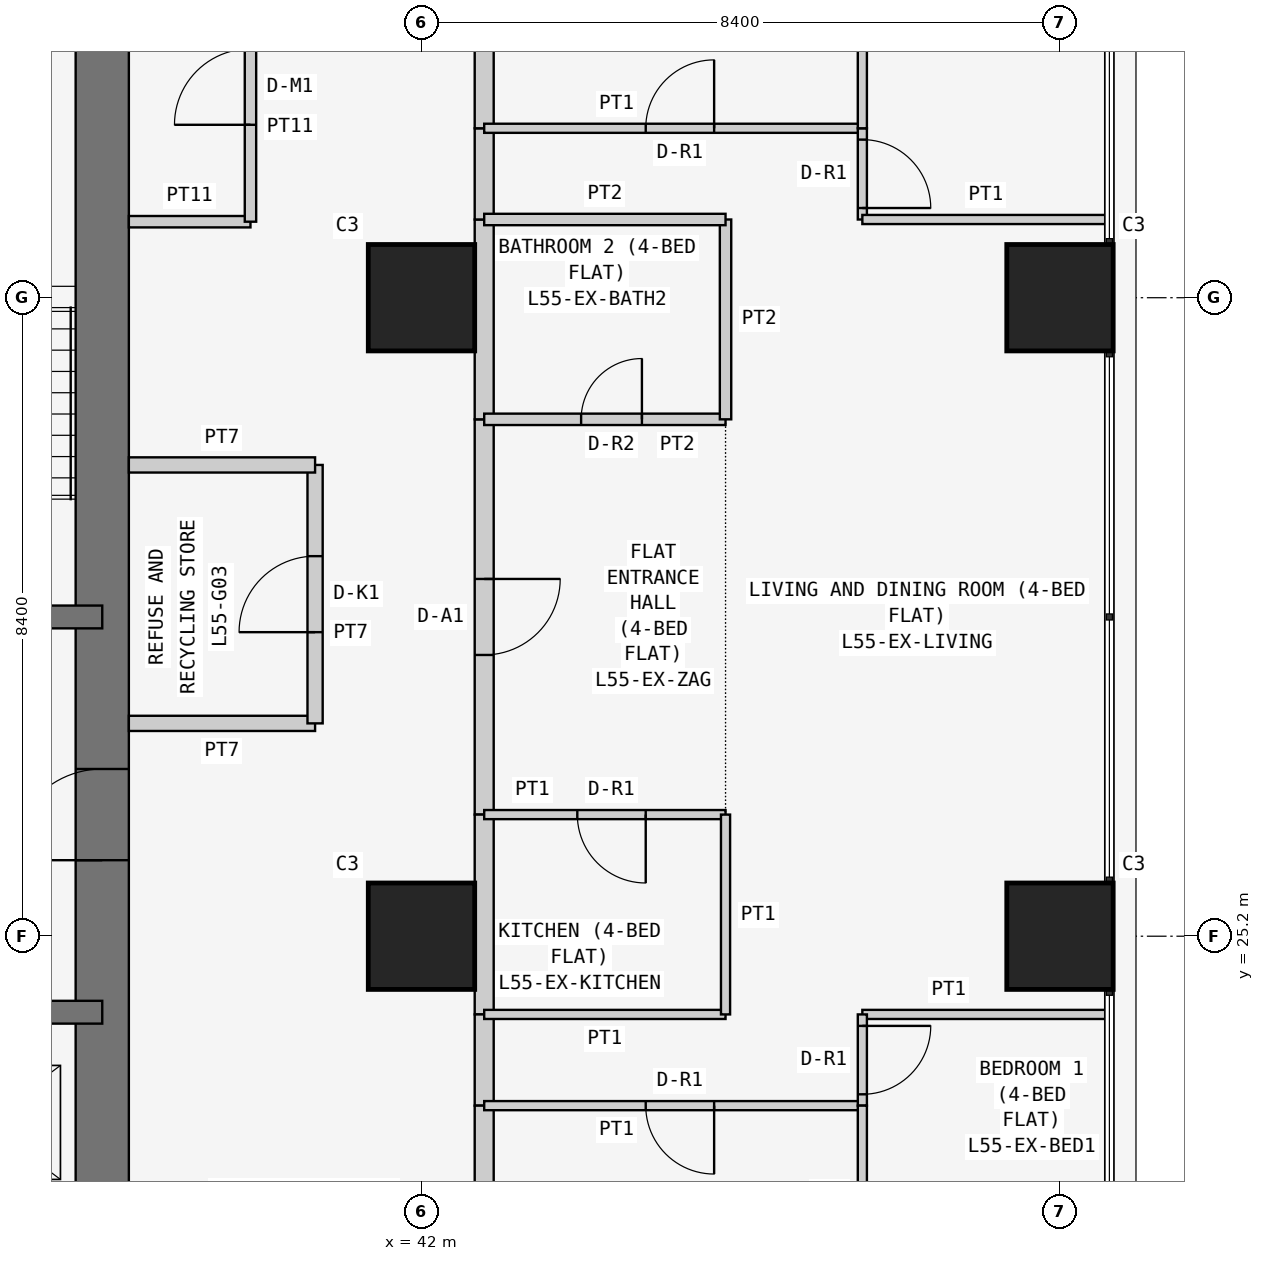
"""IFC4 building model, lengths in metres.
Left out: names, types, materials, properties, quantities, classifications, styles, units other than length and angle.
Written with IfcOpenShell. Run it as: python <this file> out.ifc"""

import sys

from ifc_helpers import new_model, si_unit, direction, frame, frame_2d, origin, origin_2d, place, context, subcontext, project, spatial, rectangle, extrude, element, fill, save


model = new_model("IFC4")
c1 = context("Model", 3, precision=1e-05, world=origin(), true_north=direction((0.0, 1.0)))
c2 = subcontext(c1, "Body", "Model", "MODEL_VIEW")
j1 = project(units=[si_unit("LENGTHUNIT", "METRE"), si_unit("PLANEANGLEUNIT", "RADIAN")], contexts=[c1])
p1 = place(None, origin())
s1 = spatial("IfcSite", under=j1, at=p1, CompositionType="ELEMENT")
p2 = place(p1, origin())
s2 = spatial("IfcBuilding", under=s1, at=p2, CompositionType="ELEMENT")
p3 = place(p2, frame((0.0, 0.0, 212.1)))
s3 = spatial("IfcBuildingStorey", under=s2, at=p3, CompositionType="ELEMENT", Elevation=212.1)
for number, where, z_axis, x_axis in (
    (1, (42.0, 25.2, 0.0), (0.0, 0.0, 1.0), (1.0, 0.0, 0.0)),
    (2, (42.0, 33.6, 0.0), (0.0, 0.0, 1.0), (1.0, 0.0, 0.0)),
    (3, (50.4, 25.2, 0.0), (0.0, 0.0, 1.0), (1.0, 0.0, 0.0)),
    (4, (50.4, 33.6, 0.0), (0.0, 0.0, 1.0), (1.0, 0.0, 0.0)),
):
    element("IfcColumn", number, at=place(p3, frame(where, z_axis=z_axis, x_axis=x_axis)), inside=s3, PredefinedType="COLUMN", context=c2, shape_type="SweptSolid", body=[
        extrude(rectangle(XDim=1.4, YDim=1.4, at=origin_2d()), origin(), (0.0, 0.0, 1.0), 3.6),
    ])
p4 = place(p3, frame((37.8, 21.0, 0.0), z_axis=(0.0, 0.0, 1.0), x_axis=(0.0, 1.0, 0.0)))
e5 = element("IfcWall", 5, at=p4, inside=s3, PredefinedType="SHEAR", context=c2, shape_type="SweptSolid", body=[
    extrude(rectangle(XDim=17.15, YDim=0.7, at=frame_2d((8.575, 0.0))), origin(), (0.0, 0.0, 1.0), 3.6),
])
p5 = place(p4, frame((5.2, 0.0, 0.0)))
e6 = element("IfcOpeningElement", 6, at=p5, cuts=e5, PredefinedType="OPENING", context=c2, shape_type="SweptSolid", body=[
    extrude(rectangle(XDim=1.2, YDim=2.1, at=frame_2d((0.6, 1.05))), frame((0.0, 0.36, 0.0), z_axis=(0.0, -1.0, 0.0), x_axis=(1.0, 0.0, 0.0)), (0.0, 0.0, 1.0), 0.72),
])
p6 = place(p3, frame((26.6, 24.2, 0.0), z_axis=(0.0, 0.0, 1.0), x_axis=(1.0, 0.0, 0.0)))
e7 = element("IfcWall", 7, at=p6, inside=s3, PredefinedType="SHEAR", context=c2, shape_type="SweptSolid", body=[
    extrude(rectangle(XDim=11.2, YDim=0.3, at=frame_2d((5.6, 0.0))), origin(), (0.0, 0.0, 1.0), 3.6),
])
p7 = place(p6, frame((0.913, 0.0, 0.0)))
e8 = element("IfcOpeningElement", 8, at=p7, cuts=e7, PredefinedType="OPENING", context=c2, shape_type="SweptSolid", body=[
    extrude(rectangle(XDim=1.0, YDim=2.1, at=frame_2d((0.5, 1.05))), frame((0.0, 0.16, 0.0), z_axis=(0.0, -1.0, 0.0), x_axis=(1.0, 0.0, 0.0)), (0.0, 0.0, 1.0), 0.32),
])
p8 = place(p6, frame((3.75, 0.0, 0.0)))
e9 = element("IfcOpeningElement", 9, at=p8, cuts=e7, PredefinedType="OPENING", context=c2, shape_type="SweptSolid", body=[
    extrude(rectangle(XDim=0.9, YDim=2.1, at=frame_2d((0.45, 1.05))), frame((0.0, 0.16, 0.0), z_axis=(0.0, -1.0, 0.0), x_axis=(1.0, 0.0, 0.0)), (0.0, 0.0, 1.0), 0.32),
])
p9 = place(p6, frame((6.45, 0.0, 0.0)))
e10 = element("IfcOpeningElement", 10, at=p9, cuts=e7, PredefinedType="OPENING", context=c2, shape_type="SweptSolid", body=[
    extrude(rectangle(XDim=1.1, YDim=2.1, at=frame_2d((0.55, 1.05))), frame((0.0, 0.16, 0.0), z_axis=(0.0, -1.0, 0.0), x_axis=(1.0, 0.0, 0.0)), (0.0, 0.0, 1.0), 0.32),
])
p10 = place(p6, frame((9.1, 0.0, 0.0)))
e11 = element("IfcOpeningElement", 11, at=p10, cuts=e7, PredefinedType="OPENING", context=c2, shape_type="SweptSolid", body=[
    extrude(rectangle(XDim=1.1, YDim=2.1, at=frame_2d((0.55, 1.05))), frame((0.0, 0.16, 0.0), z_axis=(0.0, -1.0, 0.0), x_axis=(1.0, 0.0, 0.0)), (0.0, 0.0, 1.0), 0.32),
])
p11 = place(p3, frame((32.2, 29.4, 0.0), z_axis=(0.0, 0.0, 1.0), x_axis=(1.0, 0.0, 0.0)))
e12 = element("IfcWall", 12, at=p11, inside=s3, PredefinedType="SHEAR", context=c2, shape_type="SweptSolid", body=[
    extrude(rectangle(XDim=5.6, YDim=0.3, at=frame_2d((2.8, 0.0))), origin(), (0.0, 0.0, 1.0), 3.6),
])
p12 = place(p11, frame((2.0, 0.0, 0.0)))
e13 = element("IfcOpeningElement", 13, at=p12, cuts=e12, PredefinedType="OPENING", context=c2, shape_type="SweptSolid", body=[
    extrude(rectangle(XDim=1.2, YDim=2.1, at=frame_2d((0.6, 1.05))), frame((0.0, 0.16, 0.0), z_axis=(0.0, -1.0, 0.0), x_axis=(1.0, 0.0, 0.0)), (0.0, 0.0, 1.0), 0.32),
])
p13 = place(p3, frame((38.15, 28.0, 0.0), z_axis=(0.0, 0.0, 1.0), x_axis=(1.0, 0.0, 0.0)))
e14 = element("IfcWall", 14, at=p13, inside=s3, PredefinedType="PARTITIONING", context=c2, shape_type="SweptSolid", body=[
    extrude(rectangle(XDim=2.45, YDim=0.2, at=frame_2d((1.225, 0.0))), origin(), (0.0, 0.0, 1.0), 3.45),
])
p14 = place(p3, frame((40.6, 28.0, 0.0), z_axis=(0.0, 0.0, 1.0), x_axis=(0.0, 1.0, 0.0)))
e15 = element("IfcWall", 15, at=p14, inside=s3, PredefinedType="PARTITIONING", context=c2, shape_type="SweptSolid", body=[
    extrude(rectangle(XDim=3.4, YDim=0.2, at=frame_2d((1.7, 0.0))), origin(), (0.0, 0.0, 1.0), 3.45),
])
p15 = place(p14, frame((1.2, 0.0, 0.0)))
e16 = element("IfcOpeningElement", 16, at=p15, cuts=e15, PredefinedType="OPENING", context=c2, shape_type="SweptSolid", body=[
    extrude(rectangle(XDim=1.0, YDim=2.1, at=frame_2d((0.5, 1.05))), frame((0.0, 0.11, 0.0), z_axis=(0.0, -1.0, 0.0), x_axis=(1.0, 0.0, 0.0)), (0.0, 0.0, 1.0), 0.22),
])
p16 = place(p3, frame((40.6, 31.4, 0.0), z_axis=(0.0, 0.0, 1.0), x_axis=(-1.0, 0.0, 0.0)))
e17 = element("IfcWall", 17, at=p16, inside=s3, PredefinedType="PARTITIONING", context=c2, shape_type="SweptSolid", body=[
    extrude(rectangle(XDim=2.45, YDim=0.2, at=frame_2d((1.225, 0.0))), origin(), (0.0, 0.0, 1.0), 3.45),
])
p17 = place(p3, frame((38.15, 34.6, 0.0), z_axis=(0.0, 0.0, 1.0), x_axis=(1.0, 0.0, 0.0)))
e18 = element("IfcWall", 18, at=p17, inside=s3, PredefinedType="PARTITIONING", context=c2, shape_type="SweptSolid", body=[
    extrude(rectangle(XDim=1.6, YDim=0.15, at=frame_2d((0.8, 0.0))), origin(), (0.0, 0.0, 1.0), 3.45),
])
p18 = place(p3, frame((39.75, 34.6, 0.0), z_axis=(0.0, 0.0, 1.0), x_axis=(0.0, 1.0, 0.0)))
e19 = element("IfcWall", 19, at=p18, inside=s3, PredefinedType="PARTITIONING", context=c2, shape_type="SweptSolid", body=[
    extrude(rectangle(XDim=3.55, YDim=0.15, at=frame_2d((1.775, 0.0))), origin(), (0.0, 0.0, 1.0), 3.45),
])
p19 = place(p18, frame((1.275, 0.0, 0.0)))
e20 = element("IfcOpeningElement", 20, at=p19, cuts=e19, PredefinedType="OPENING", context=c2, shape_type="SweptSolid", body=[
    extrude(rectangle(XDim=1.0, YDim=2.1, at=frame_2d((0.5, 1.05))), frame((0.0, 0.085, 0.0), z_axis=(0.0, -1.0, 0.0), x_axis=(1.0, 0.0, 0.0)), (0.0, 0.0, 1.0), 0.17),
])
p20 = place(p3, frame((42.825, 32.0, 0.0), z_axis=(0.0, 0.0, 1.0), x_axis=(0.0, -1.0, 0.0)))
e21 = element("IfcWall", 21, at=p20, inside=s3, PredefinedType="PARTITIONING", context=c2, shape_type="SweptSolid", body=[
    extrude(rectangle(XDim=5.2, YDim=0.25, at=frame_2d((2.6, 0.0))), origin(), (0.0, 0.0, 1.0), 3.45),
])
p21 = place(p20, frame((2.1, 0.0, 0.0)))
e22 = element("IfcOpeningElement", 22, at=p21, cuts=e21, PredefinedType="OPENING", context=c2, shape_type="SweptSolid", body=[
    extrude(rectangle(XDim=1.0, YDim=2.1, at=frame_2d((0.5, 1.05))), frame((0.0, 0.135, 0.0), z_axis=(0.0, -1.0, 0.0), x_axis=(1.0, 0.0, 0.0)), (0.0, 0.0, 1.0), 0.27),
])
p22 = place(p3, frame((42.825, 34.629, 0.0), z_axis=(0.0, 0.0, 1.0), x_axis=(0.0, -1.0, 0.0)))
e23 = element("IfcWall", 23, at=p22, inside=s3, PredefinedType="PARTITIONING", context=c2, shape_type="SweptSolid", body=[
    extrude(rectangle(XDim=2.629, YDim=0.25, at=frame_2d((1.314, 0.0))), origin(), (0.0, 0.0, 1.0), 3.45),
])
p23 = place(p3, frame((42.825, 26.8, 0.0), z_axis=(0.0, 0.0, 1.0), x_axis=(0.0, -1.0, 0.0)))
e24 = element("IfcWall", 24, at=p23, inside=s3, PredefinedType="PARTITIONING", context=c2, shape_type="SweptSolid", body=[
    extrude(rectangle(XDim=2.629, YDim=0.25, at=frame_2d((1.314, 0.0))), origin(), (0.0, 0.0, 1.0), 3.45),
])
p24 = place(p3, frame((42.825, 24.171, 0.0), z_axis=(0.0, 0.0, 1.0), x_axis=(0.0, -1.0, 0.0)))
e25 = element("IfcWall", 25, at=p24, inside=s3, PredefinedType="PARTITIONING", context=c2, shape_type="SweptSolid", body=[
    extrude(rectangle(XDim=1.2, YDim=0.25, at=frame_2d((0.6, 0.0))), origin(), (0.0, 0.0, 1.0), 3.45),
])
p25 = place(p3, frame((42.825, 35.829, 0.0), z_axis=(0.0, 0.0, 1.0), x_axis=(0.0, -1.0, 0.0)))
e26 = element("IfcWall", 26, at=p25, inside=s3, PredefinedType="PARTITIONING", context=c2, shape_type="SweptSolid", body=[
    extrude(rectangle(XDim=1.2, YDim=0.25, at=frame_2d((0.6, 0.0))), origin(), (0.0, 0.0, 1.0), 3.45),
])
for number, where, z_axis, x_axis in (
    (27, (42.825, 42.7, 0.0), (0.0, 0.0, 1.0), (0.0, -1.0, 0.0)),
    (28, (42.825, 22.971, 0.0), (0.0, 0.0, 1.0), (0.0, -1.0, 0.0)),
):
    element("IfcWall", number, at=place(p3, frame(where, z_axis=z_axis, x_axis=x_axis)), inside=s3, PredefinedType="PARTITIONING", context=c2, shape_type="SweptSolid", body=[
        extrude(rectangle(XDim=6.871, YDim=0.25, at=frame_2d((3.436, 0.0))), origin(), (0.0, 0.0, 1.0), 3.45),
    ])
p26 = place(p3, frame((46.0, 32.0, 0.0), z_axis=(0.0, 0.0, 1.0), x_axis=(-1.0, 0.0, 0.0)))
e29 = element("IfcWall", 29, at=p26, inside=s3, PredefinedType="PARTITIONING", context=c2, shape_type="SweptSolid", body=[
    extrude(rectangle(XDim=3.175, YDim=0.15, at=frame_2d((1.587, 0.0))), origin(), (0.0, 0.0, 1.0), 3.45),
])
p27 = place(p26, frame((1.1, 0.0, 0.0)))
e30 = element("IfcOpeningElement", 30, at=p27, cuts=e29, PredefinedType="OPENING", context=c2, shape_type="SweptSolid", body=[
    extrude(rectangle(XDim=0.8, YDim=2.1, at=frame_2d((0.4, 1.05))), frame((0.0, 0.085, 0.0), z_axis=(0.0, -1.0, 0.0), x_axis=(1.0, 0.0, 0.0)), (0.0, 0.0, 1.0), 0.17),
])
p28 = place(p3, frame((42.825, 26.8, 0.0), z_axis=(0.0, 0.0, 1.0), x_axis=(1.0, 0.0, 0.0)))
e31 = element("IfcWall", 31, at=p28, inside=s3, PredefinedType="PARTITIONING", context=c2, shape_type="SweptSolid", body=[
    extrude(rectangle(XDim=3.175, YDim=0.12, at=frame_2d((1.587, 0.0))), origin(), (0.0, 0.0, 1.0), 3.45),
])
p29 = place(p28, frame((1.225, 0.0, 0.0)))
e32 = element("IfcOpeningElement", 32, at=p29, cuts=e31, PredefinedType="OPENING", context=c2, shape_type="SweptSolid", body=[
    extrude(rectangle(XDim=0.9, YDim=2.1, at=frame_2d((0.45, 1.05))), frame((0.0, 0.07, 0.0), z_axis=(0.0, -1.0, 0.0), x_axis=(1.0, 0.0, 0.0)), (0.0, 0.0, 1.0), 0.14),
])
p30 = place(p3, frame((46.0, 32.0, 0.0), z_axis=(0.0, 0.0, 1.0), x_axis=(0.0, 1.0, 0.0)))
e33 = element("IfcWall", 33, at=p30, inside=s3, PredefinedType="PARTITIONING", context=c2, shape_type="SweptSolid", body=[
    extrude(rectangle(XDim=2.629, YDim=0.15, at=frame_2d((1.314, 0.0))), origin(), (0.0, 0.0, 1.0), 3.45),
])
p31 = place(p3, frame((46.0, 34.629, 0.0), z_axis=(0.0, 0.0, 1.0), x_axis=(-1.0, 0.0, 0.0)))
e34 = element("IfcWall", 34, at=p31, inside=s3, PredefinedType="PARTITIONING", context=c2, shape_type="SweptSolid", body=[
    extrude(rectangle(XDim=3.175, YDim=0.15, at=frame_2d((1.587, 0.0))), origin(), (0.0, 0.0, 1.0), 3.45),
])
p32 = place(p3, frame((42.825, 24.171, 0.0), z_axis=(0.0, 0.0, 1.0), x_axis=(1.0, 0.0, 0.0)))
e35 = element("IfcWall", 35, at=p32, inside=s3, PredefinedType="PARTITIONING", context=c2, shape_type="SweptSolid", body=[
    extrude(rectangle(XDim=3.175, YDim=0.12, at=frame_2d((1.587, 0.0))), origin(), (0.0, 0.0, 1.0), 3.45),
])
p33 = place(p3, frame((46.0, 24.171, 0.0), z_axis=(0.0, 0.0, 1.0), x_axis=(0.0, 1.0, 0.0)))
e36 = element("IfcWall", 36, at=p33, inside=s3, PredefinedType="PARTITIONING", context=c2, shape_type="SweptSolid", body=[
    extrude(rectangle(XDim=2.629, YDim=0.12, at=frame_2d((1.314, 0.0))), origin(), (0.0, 0.0, 1.0), 3.45),
])
p34 = place(p3, frame((42.825, 35.829, 0.0), z_axis=(0.0, 0.0, 1.0), x_axis=(1.0, 0.0, 0.0)))
e37 = element("IfcWall", 37, at=p34, inside=s3, PredefinedType="PARTITIONING", context=c2, shape_type="SweptSolid", body=[
    extrude(rectangle(XDim=4.975, YDim=0.12, at=frame_2d((2.488, 0.0))), origin(), (0.0, 0.0, 1.0), 3.45),
])
p35 = place(p34, frame((2.125, 0.0, 0.0)))
e38 = element("IfcOpeningElement", 38, at=p35, cuts=e37, PredefinedType="OPENING", context=c2, shape_type="SweptSolid", body=[
    extrude(rectangle(XDim=0.9, YDim=2.1, at=frame_2d((0.45, 1.05))), frame((0.0, 0.07, 0.0), z_axis=(0.0, -1.0, 0.0), x_axis=(1.0, 0.0, 0.0)), (0.0, 0.0, 1.0), 0.14),
])
p36 = place(p3, frame((47.8, 35.829, 0.0), z_axis=(0.0, 0.0, 1.0), x_axis=(0.0, -1.0, 0.0)))
e39 = element("IfcWall", 39, at=p36, inside=s3, PredefinedType="PARTITIONING", context=c2, shape_type="SweptSolid", body=[
    extrude(rectangle(XDim=1.2, YDim=0.12, at=frame_2d((0.6, 0.0))), origin(), (0.0, 0.0, 1.0), 3.45),
])
p37 = place(p36, frame((0.149, 0.0, 0.0)))
e40 = element("IfcOpeningElement", 40, at=p37, cuts=e39, PredefinedType="OPENING", context=c2, shape_type="SweptSolid", body=[
    extrude(rectangle(XDim=0.9, YDim=2.1, at=frame_2d((0.45, 1.05))), frame((0.0, 0.07, 0.0), z_axis=(0.0, -1.0, 0.0), x_axis=(1.0, 0.0, 0.0)), (0.0, 0.0, 1.0), 0.14),
])
p38 = place(p3, frame((47.8, 34.629, 0.0), z_axis=(0.0, 0.0, 1.0), x_axis=(1.0, 0.0, 0.0)))
e41 = element("IfcWall", 41, at=p38, inside=s3, PredefinedType="PARTITIONING", context=c2, shape_type="SweptSolid", body=[
    extrude(rectangle(XDim=3.25, YDim=0.12, at=frame_2d((1.625, 0.0))), origin(), (0.0, 0.0, 1.0), 3.45),
])
p39 = place(p3, frame((47.8, 22.971, 0.0), z_axis=(0.0, 0.0, 1.0), x_axis=(-1.0, 0.0, 0.0)))
e42 = element("IfcWall", 42, at=p39, inside=s3, PredefinedType="PARTITIONING", context=c2, shape_type="SweptSolid", body=[
    extrude(rectangle(XDim=4.975, YDim=0.12, at=frame_2d((2.488, 0.0))), origin(), (0.0, 0.0, 1.0), 3.45),
])
p40 = place(p39, frame((1.95, 0.0, 0.0)))
e43 = element("IfcOpeningElement", 43, at=p40, cuts=e42, PredefinedType="OPENING", context=c2, shape_type="SweptSolid", body=[
    extrude(rectangle(XDim=0.9, YDim=2.1, at=frame_2d((0.45, 1.05))), frame((0.0, 0.07, 0.0), z_axis=(0.0, -1.0, 0.0), x_axis=(1.0, 0.0, 0.0)), (0.0, 0.0, 1.0), 0.14),
])
p41 = place(p3, frame((51.05, 24.171, 0.0), z_axis=(0.0, 0.0, 1.0), x_axis=(-1.0, 0.0, 0.0)))
e44 = element("IfcWall", 44, at=p41, inside=s3, PredefinedType="PARTITIONING", context=c2, shape_type="SweptSolid", body=[
    extrude(rectangle(XDim=3.25, YDim=0.12, at=frame_2d((1.625, 0.0))), origin(), (0.0, 0.0, 1.0), 3.45),
])
p42 = place(p3, frame((47.8, 24.171, 0.0), z_axis=(0.0, 0.0, 1.0), x_axis=(0.0, -1.0, 0.0)))
e45 = element("IfcWall", 45, at=p42, inside=s3, PredefinedType="PARTITIONING", context=c2, shape_type="SweptSolid", body=[
    extrude(rectangle(XDim=1.2, YDim=0.12, at=frame_2d((0.6, 0.0))), origin(), (0.0, 0.0, 1.0), 3.45),
])
p43 = place(p42, frame((0.151, 0.0, 0.0)))
e46 = element("IfcOpeningElement", 46, at=p43, cuts=e45, PredefinedType="OPENING", context=c2, shape_type="SweptSolid", body=[
    extrude(rectangle(XDim=0.9, YDim=2.1, at=frame_2d((0.45, 1.05))), frame((0.0, 0.07, 0.0), z_axis=(0.0, -1.0, 0.0), x_axis=(1.0, 0.0, 0.0)), (0.0, 0.0, 1.0), 0.14),
])
p44 = place(p3, frame((47.8, 35.829, 0.0), z_axis=(0.0, 0.0, 1.0), x_axis=(0.0, 1.0, 0.0)))
e47 = element("IfcWall", 47, at=p44, inside=s3, PredefinedType="PARTITIONING", context=c2, shape_type="SweptSolid", body=[
    extrude(rectangle(XDim=6.871, YDim=0.12, at=frame_2d((3.436, 0.0))), origin(), (0.0, 0.0, 1.0), 3.45),
])
p45 = place(p3, frame((47.8, 20.686, 0.0), z_axis=(0.0, 0.0, 1.0), x_axis=(0.0, 1.0, 0.0)))
e48 = element("IfcWall", 48, at=p45, inside=s3, PredefinedType="PARTITIONING", context=c2, shape_type="SweptSolid", body=[
    extrude(rectangle(XDim=2.285, YDim=0.12, at=frame_2d((1.143, 0.0))), origin(), (0.0, 0.0, 1.0), 3.45),
])
p46 = place(p15, origin())
e49 = element("IfcDoor", 49, at=p46, inside=s3, OperationType="SINGLE_SWING_LEFT", PredefinedType="DOOR", context=c2, shape_type="SweptSolid", body=[
    extrude(rectangle(XDim=1.0, YDim=2.1, at=frame_2d((0.5, 1.05))), frame((0.0, 0.025, 0.0), z_axis=(0.0, -1.0, 0.0), x_axis=(1.0, 0.0, 0.0)), (0.0, 0.0, 1.0), 0.05),
])
fill(e16, e49)
p47 = place(p19, origin())
e50 = element("IfcDoor", 50, at=p47, inside=s3, OperationType="SINGLE_SWING_LEFT", PredefinedType="DOOR", context=c2, shape_type="SweptSolid", body=[
    extrude(rectangle(XDim=1.0, YDim=2.1, at=frame_2d((0.5, 1.05))), frame((0.0, 0.025, 0.0), z_axis=(0.0, -1.0, 0.0), x_axis=(1.0, 0.0, 0.0)), (0.0, 0.0, 1.0), 0.05),
])
fill(e20, e50)
p48 = place(p21, origin())
e51 = element("IfcDoor", 51, at=p48, inside=s3, OperationType="SINGLE_SWING_LEFT", PredefinedType="DOOR", context=c2, shape_type="SweptSolid", body=[
    extrude(rectangle(XDim=1.0, YDim=2.1, at=frame_2d((0.5, 1.05))), frame((0.0, 0.025, 0.0), z_axis=(0.0, -1.0, 0.0), x_axis=(1.0, 0.0, 0.0)), (0.0, 0.0, 1.0), 0.05),
])
fill(e22, e51)
p49 = place(p27, frame((0.8, 0.0, 0.0), z_axis=(0.0, 0.0, 1.0), x_axis=(-1.0, 0.0, 0.0)))
e52 = element("IfcDoor", 52, at=p49, inside=s3, OperationType="SINGLE_SWING_RIGHT", PredefinedType="DOOR", context=c2, shape_type="SweptSolid", body=[
    extrude(rectangle(XDim=0.8, YDim=2.1, at=frame_2d((0.4, 1.05))), frame((0.0, 0.025, 0.0), z_axis=(0.0, -1.0, 0.0), x_axis=(1.0, 0.0, 0.0)), (0.0, 0.0, 1.0), 0.05),
])
fill(e30, e52)
p50 = place(p29, frame((0.9, 0.0, 0.0), z_axis=(0.0, 0.0, 1.0), x_axis=(-1.0, 0.0, 0.0)))
e53 = element("IfcDoor", 53, at=p50, inside=s3, OperationType="SINGLE_SWING_LEFT", PredefinedType="DOOR", context=c2, shape_type="SweptSolid", body=[
    extrude(rectangle(XDim=0.9, YDim=2.1, at=frame_2d((0.45, 1.05))), frame((0.0, 0.025, 0.0), z_axis=(0.0, -1.0, 0.0), x_axis=(1.0, 0.0, 0.0)), (0.0, 0.0, 1.0), 0.05),
])
fill(e32, e53)
p51 = place(p35, origin())
e54 = element("IfcDoor", 54, at=p51, inside=s3, OperationType="SINGLE_SWING_RIGHT", PredefinedType="DOOR", context=c2, shape_type="SweptSolid", body=[
    extrude(rectangle(XDim=0.9, YDim=2.1, at=frame_2d((0.45, 1.05))), frame((0.0, 0.025, 0.0), z_axis=(0.0, -1.0, 0.0), x_axis=(1.0, 0.0, 0.0)), (0.0, 0.0, 1.0), 0.05),
])
fill(e38, e54)
p52 = place(p37, origin())
e55 = element("IfcDoor", 55, at=p52, inside=s3, OperationType="SINGLE_SWING_RIGHT", PredefinedType="DOOR", context=c2, shape_type="SweptSolid", body=[
    extrude(rectangle(XDim=0.9, YDim=2.1, at=frame_2d((0.45, 1.05))), frame((0.0, 0.025, 0.0), z_axis=(0.0, -1.0, 0.0), x_axis=(1.0, 0.0, 0.0)), (0.0, 0.0, 1.0), 0.05),
])
fill(e40, e55)
p53 = place(p40, origin())
e56 = element("IfcDoor", 56, at=p53, inside=s3, OperationType="SINGLE_SWING_LEFT", PredefinedType="DOOR", context=c2, shape_type="SweptSolid", body=[
    extrude(rectangle(XDim=0.9, YDim=2.1, at=frame_2d((0.45, 1.05))), frame((0.0, 0.025, 0.0), z_axis=(0.0, -1.0, 0.0), x_axis=(1.0, 0.0, 0.0)), (0.0, 0.0, 1.0), 0.05),
])
fill(e43, e56)
p54 = place(p43, origin())
e57 = element("IfcDoor", 57, at=p54, inside=s3, OperationType="SINGLE_SWING_LEFT", PredefinedType="DOOR", context=c2, shape_type="SweptSolid", body=[
    extrude(rectangle(XDim=0.9, YDim=2.1, at=frame_2d((0.45, 1.05))), frame((0.0, 0.025, 0.0), z_axis=(0.0, -1.0, 0.0), x_axis=(1.0, 0.0, 0.0)), (0.0, 0.0, 1.0), 0.05),
])
fill(e46, e57)
p55 = place(p5, origin())
e58 = element("IfcDoor", 58, at=p55, inside=s3, OperationType="SINGLE_SWING_LEFT", PredefinedType="DOOR", context=c2, shape_type="SweptSolid", body=[
    extrude(rectangle(XDim=1.2, YDim=2.1, at=frame_2d((0.6, 1.05))), frame((0.0, 0.025, 0.0), z_axis=(0.0, -1.0, 0.0), x_axis=(1.0, 0.0, 0.0)), (0.0, 0.0, 1.0), 0.05),
])
fill(e6, e58)
save(model, sys.argv[1])
